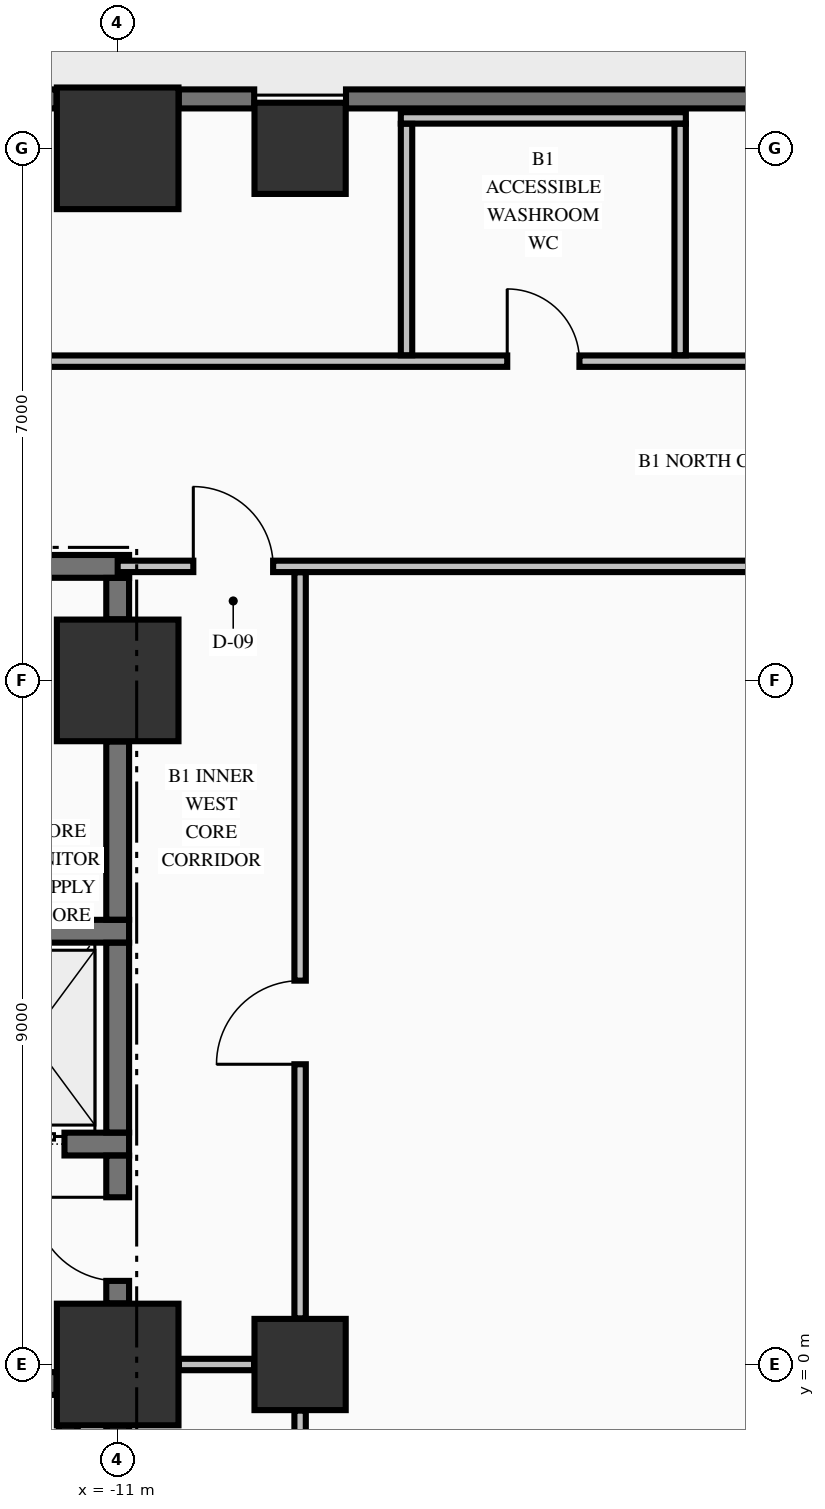
"""IFC4 building model, lengths in metres.
Left out: names, types, materials, properties, quantities, classifications, styles, units other than length and angle.
Written with IfcOpenShell. Run it as: python <this file> out.ifc"""

import sys

from ifc_helpers import new_model, si_unit, direction, frame, frame_2d, origin, origin_2d, place, context, subcontext, project, spatial, rectangle, extrude, element, fill, save


model = new_model("IFC4")
c1 = context("Model", 3, precision=1e-05, world=origin(), true_north=direction((0.0, 1.0)))
c2 = subcontext(c1, "Body", "Model", "MODEL_VIEW")
j1 = project(units=[si_unit("LENGTHUNIT", "METRE"), si_unit("PLANEANGLEUNIT", "RADIAN")], contexts=[c1])
p1 = place(None, origin())
s1 = spatial("IfcSite", under=j1, at=p1, CompositionType="ELEMENT")
p2 = place(p1, origin())
s2 = spatial("IfcBuilding", under=s1, at=p2, CompositionType="ELEMENT")
p3 = place(p2, frame((0.0, 0.0, -4.55)))
s3 = spatial("IfcBuildingStorey", under=s2, at=p3, CompositionType="ELEMENT", Elevation=-4.55)
for number, where, z_axis, x_axis in (
    (1, (-11.0, 0.0, 0.0), (0.0, 0.0, 1.0), (1.0, 0.0, 0.0)),
    (2, (-11.0, 9.0, 0.0), (0.0, 0.0, 1.0), (1.0, 0.0, 0.0)),
    (3, (-11.0, 16.0, 0.0), (0.0, 0.0, 1.0), (1.0, 0.0, 0.0)),
):
    element("IfcColumn", number, at=place(p3, frame(where, z_axis=z_axis, x_axis=x_axis)), inside=s3, PredefinedType="COLUMN", context=c2, shape_type="SweptSolid", body=[
        extrude(rectangle(XDim=1.6, YDim=1.6, at=origin_2d()), origin(), (0.0, 0.0, 1.0), 4.2),
    ])
for number, where, z_axis, x_axis in (
    (4, (-8.6, 0.0, 0.0), (0.0, 0.0, 1.0), (1.0, 0.0, 0.0)),
    (5, (-8.6, 16.0, 0.0), (0.0, 0.0, 1.0), (1.0, 0.0, 0.0)),
):
    element("IfcColumn", number, at=place(p3, frame(where, z_axis=z_axis, x_axis=x_axis)), inside=s3, PredefinedType="COLUMN", context=c2, shape_type="SweptSolid", body=[
        extrude(rectangle(XDim=1.2, YDim=1.2, at=origin_2d()), origin(), (0.0, 0.0, 1.0), 4.2),
    ])
p4 = place(p3, frame((-19.196, -0.25, 0.0), z_axis=(0.0, 0.0, 1.0), x_axis=(1.0, 0.0, 0.0)))
e6 = element("IfcWall", 6, at=p4, inside=s3, PredefinedType="SHEAR", context=c2, shape_type="SweptSolid", body=[
    extrude(rectangle(XDim=7.392, YDim=0.3, at=frame_2d((3.696, 0.0))), origin(), (0.0, 0.0, 1.0), 4.2),
])
p5 = place(p4, frame((5.496, 0.0, 0.0)))
e7 = element("IfcOpeningElement", 7, at=p5, cuts=e6, PredefinedType="OPENING", context=c2, shape_type="SweptSolid", body=[
    extrude(rectangle(XDim=1.1, YDim=2.15, at=frame_2d((0.55, 1.075))), frame((0.0, 0.16, 0.0), z_axis=(0.0, -1.0, 0.0), x_axis=(1.0, 0.0, 0.0)), (0.0, 0.0, 1.0), 0.32),
])
p6 = place(p3, frame((-14.875, 2.9, 0.0), z_axis=(0.0, 0.0, 1.0), x_axis=(1.0, 0.0, 0.0)))
e8 = element("IfcWall", 8, at=p6, inside=s3, PredefinedType="SHEAR", context=c2, shape_type="SweptSolid", body=[
    extrude(rectangle(XDim=4.025, YDim=0.3, at=frame_2d((2.012, 0.0))), origin(), (0.0, 0.0, 1.0), 4.2),
])
p7 = place(p6, frame((2.075, 0.0, 0.0)))
e9 = element("IfcOpeningElement", 9, at=p7, cuts=e8, PredefinedType="OPENING", context=c2, shape_type="SweptSolid", body=[
    extrude(rectangle(XDim=1.1, YDim=2.2, at=frame_2d((0.55, 1.1))), frame((0.0, 0.16, 0.0), z_axis=(0.0, -1.0, 0.0), x_axis=(1.0, 0.0, 0.0)), (0.0, 0.0, 1.0), 0.32),
])
p8 = place(p3, frame((-14.875, 5.7, 0.0), z_axis=(0.0, 0.0, 1.0), x_axis=(1.0, 0.0, 0.0)))
e10 = element("IfcWall", 10, at=p8, inside=s3, PredefinedType="SHEAR", context=c2, shape_type="SweptSolid", body=[
    extrude(rectangle(XDim=4.025, YDim=0.3, at=frame_2d((2.012, 0.0))), origin(), (0.0, 0.0, 1.0), 4.2),
])
p9 = place(p3, frame((-14.7, 10.5, 0.0), z_axis=(0.0, 0.0, 1.0), x_axis=(1.0, 0.0, 0.0)))
e11 = element("IfcWall", 11, at=p9, inside=s3, PredefinedType="SHEAR", context=c2, shape_type="SweptSolid", body=[
    extrude(rectangle(XDim=3.85, YDim=0.3, at=frame_2d((1.925, 0.0))), origin(), (0.0, 0.0, 1.0), 4.2),
])
p10 = place(p9, frame((0.245, 0.0, 0.0)))
e12 = element("IfcOpeningElement", 12, at=p10, cuts=e11, PredefinedType="OPENING", context=c2, shape_type="SweptSolid", body=[
    extrude(rectangle(XDim=0.95, YDim=2.15, at=frame_2d((0.475, 1.075))), frame((0.0, 0.16, 0.0), z_axis=(0.0, -1.0, 0.0), x_axis=(1.0, 0.0, 0.0)), (0.0, 0.0, 1.0), 0.32),
])
p11 = place(p3, frame((-19.196, 16.65, 0.0), z_axis=(0.0, 0.0, 1.0), x_axis=(1.0, 0.0, 0.0)))
e13 = element("IfcWall", 13, at=p11, inside=s3, PredefinedType="SOLIDWALL", context=c2, shape_type="SweptSolid", body=[
    extrude(rectangle(XDim=7.392, YDim=0.25, at=frame_2d((3.696, 0.0))), origin(), (0.0, 0.0, 1.0), 4.2),
])
p12 = place(p3, frame((-10.196, 16.65, 0.0), z_axis=(0.0, 0.0, 1.0), x_axis=(1.0, 0.0, 0.0)))
e14 = element("IfcWall", 14, at=p12, inside=s3, PredefinedType="SOLIDWALL", context=c2, shape_type="SweptSolid", body=[
    extrude(rectangle(XDim=0.992, YDim=0.25, at=frame_2d((0.496, 0.0))), origin(), (0.0, 0.0, 1.0), 4.2),
])
p13 = place(p3, frame((-7.996, 16.65, 0.0), z_axis=(0.0, 0.0, 1.0), x_axis=(1.0, 0.0, 0.0)))
e15 = element("IfcWall", 15, at=p13, inside=s3, PredefinedType="SOLIDWALL", context=c2, shape_type="SweptSolid", body=[
    extrude(rectangle(XDim=7.292, YDim=0.25, at=frame_2d((3.646, 0.0))), origin(), (0.0, 0.0, 1.0), 4.2),
])
p14 = place(p3, frame((-10.194, 0.0, 0.0), z_axis=(0.0, 0.0, 1.0), x_axis=(1.0, 0.0, 0.0)))
e16 = element("IfcWall", 16, at=p14, inside=s3, PredefinedType="PARTITIONING", context=c2, shape_type="SweptSolid", body=[
    extrude(rectangle(XDim=0.988, YDim=0.15, at=frame_2d((0.494, 0.0))), origin(), (0.0, 0.0, 1.0), 3.242),
])
p15 = place(p3, frame((-11.0, 10.5, 0.0), z_axis=(0.0, 0.0, 1.0), x_axis=(1.0, 0.0, 0.0)))
e17 = element("IfcWall", 17, at=p15, inside=s3, PredefinedType="PARTITIONING", context=c2, shape_type="SweptSolid", body=[
    extrude(rectangle(XDim=22.0, YDim=0.15, at=frame_2d((11.0, 0.0))), origin(), (0.0, 0.0, 1.0), 4.2),
])
p16 = place(p15, frame((0.995, 0.0, 0.0)))
e18 = element("IfcOpeningElement", 18, at=p16, cuts=e17, PredefinedType="OPENING", context=c2, shape_type="SweptSolid", body=[
    extrude(rectangle(XDim=1.05, YDim=2.15, at=frame_2d((0.525, 1.075))), frame((0.0, 0.085, 0.0), z_axis=(0.0, -1.0, 0.0), x_axis=(1.0, 0.0, 0.0)), (0.0, 0.0, 1.0), 0.17),
])
p17 = place(p15, frame((19.955, 0.0, 0.0)))
e19 = element("IfcOpeningElement", 19, at=p17, cuts=e17, PredefinedType="OPENING", context=c2, shape_type="SweptSolid", body=[
    extrude(rectangle(XDim=1.05, YDim=2.15, at=frame_2d((0.525, 1.075))), frame((0.0, 0.085, 0.0), z_axis=(0.0, -1.0, 0.0), x_axis=(1.0, 0.0, 0.0)), (0.0, 0.0, 1.0), 0.17),
])
p18 = place(p3, frame((-22.475, 13.2, 0.0), z_axis=(0.0, 0.0, 1.0), x_axis=(1.0, 0.0, 0.0)))
e20 = element("IfcWall", 20, at=p18, inside=s3, PredefinedType="PARTITIONING", context=c2, shape_type="SweptSolid", body=[
    extrude(rectangle(XDim=56.197, YDim=0.15, at=frame_2d((28.099, 0.0))), origin(), (0.0, 0.0, 1.0), 4.2),
])
p19 = place(p18, frame((43.125, 0.0, 0.0)))
e21 = element("IfcOpeningElement", 21, at=p19, cuts=e20, PredefinedType="OPENING", context=c2, shape_type="SweptSolid", body=[
    extrude(rectangle(XDim=1.1, YDim=2.15, at=frame_2d((0.55, 1.075))), frame((0.0, 0.085, 0.0), z_axis=(0.0, -1.0, 0.0), x_axis=(1.0, 0.0, 0.0)), (0.0, 0.0, 1.0), 0.17),
])
p20 = place(p18, frame((27.375, 0.0, 0.0)))
e22 = element("IfcOpeningElement", 22, at=p20, cuts=e20, PredefinedType="OPENING", context=c2, shape_type="SweptSolid", body=[
    extrude(rectangle(XDim=1.2, YDim=2.15, at=frame_2d((0.6, 1.075))), frame((0.0, 0.085, 0.0), z_axis=(0.0, -1.0, 0.0), x_axis=(1.0, 0.0, 0.0)), (0.0, 0.0, 1.0), 0.17),
])
p21 = place(p18, frame((46.375, 0.0, 0.0)))
e23 = element("IfcOpeningElement", 23, at=p21, cuts=e20, PredefinedType="OPENING", context=c2, shape_type="SweptSolid", body=[
    extrude(rectangle(XDim=1.2, YDim=2.15, at=frame_2d((0.6, 1.075))), frame((0.0, 0.085, 0.0), z_axis=(0.0, -1.0, 0.0), x_axis=(1.0, 0.0, 0.0)), (0.0, 0.0, 1.0), 0.17),
])
p22 = place(p18, frame((16.6, 0.0, 0.0)))
e24 = element("IfcOpeningElement", 24, at=p22, cuts=e20, PredefinedType="OPENING", context=c2, shape_type="SweptSolid", body=[
    extrude(rectangle(XDim=0.95, YDim=2.15, at=frame_2d((0.475, 1.075))), frame((0.0, 0.085, 0.0), z_axis=(0.0, -1.0, 0.0), x_axis=(1.0, 0.0, 0.0)), (0.0, 0.0, 1.0), 0.17),
])
p23 = place(p3, frame((-7.275, 16.4, 0.0), z_axis=(0.0, 0.0, 1.0), x_axis=(1.0, 0.0, 0.0)))
e25 = element("IfcWall", 25, at=p23, inside=s3, PredefinedType="PARTITIONING", context=c2, shape_type="SweptSolid", body=[
    extrude(rectangle(XDim=3.75, YDim=0.15, at=frame_2d((1.875, 0.0))), origin(), (0.0, 0.0, 1.0), 3.242),
])
p24 = place(p3, frame((-11.65, -8.196, 0.0), z_axis=(0.0, 0.0, 1.0), x_axis=(0.0, 1.0, 0.0)))
e26 = element("IfcWall", 26, at=p24, inside=s3, PredefinedType="SOLIDWALL", context=c2, shape_type="SweptSolid", body=[
    extrude(rectangle(XDim=7.392, YDim=0.25, at=frame_2d((3.696, 0.0))), origin(), (0.0, 0.0, 1.0), 4.2),
])
p25 = place(p3, frame((-11.0, -8.196, 0.0), z_axis=(0.0, 0.0, 1.0), x_axis=(0.0, 1.0, 0.0)))
e27 = element("IfcWall", 27, at=p25, inside=s3, PredefinedType="SHEAR", context=c2, shape_type="SweptSolid", body=[
    extrude(rectangle(XDim=7.392, YDim=0.3, at=frame_2d((3.696, 0.0))), origin(), (0.0, 0.0, 1.0), 4.2),
])
p26 = place(p3, frame((-11.0, 0.804, 0.0), z_axis=(0.0, 0.0, 1.0), x_axis=(0.0, 1.0, 0.0)))
e28 = element("IfcWall", 28, at=p26, inside=s3, PredefinedType="SHEAR", context=c2, shape_type="SweptSolid", body=[
    extrude(rectangle(XDim=1.944, YDim=0.3, at=frame_2d((0.972, 0.0))), origin(), (0.0, 0.0, 1.0), 4.2),
])
p27 = place(p26, frame((0.296, 0.0, 0.0)))
e29 = element("IfcOpeningElement", 29, at=p27, cuts=e28, PredefinedType="OPENING", context=c2, shape_type="SweptSolid", body=[
    extrude(rectangle(XDim=1.1, YDim=2.15, at=frame_2d((0.55, 1.075))), frame((0.0, 0.16, 0.0), z_axis=(0.0, -1.0, 0.0), x_axis=(1.0, 0.0, 0.0)), (0.0, 0.0, 1.0), 0.32),
])
p28 = place(p3, frame((-11.0, 3.052, 0.0), z_axis=(0.0, 0.0, 1.0), x_axis=(0.0, 1.0, 0.0)))
e30 = element("IfcWall", 30, at=p28, inside=s3, PredefinedType="SHEAR", context=c2, shape_type="SweptSolid", body=[
    extrude(rectangle(XDim=2.496, YDim=0.3, at=frame_2d((1.248, 0.0))), origin(), (0.0, 0.0, 1.0), 4.2),
])
p29 = place(p3, frame((-11.0, 5.852, 0.0), z_axis=(0.0, 0.0, 1.0), x_axis=(0.0, 1.0, 0.0)))
e31 = element("IfcWall", 31, at=p29, inside=s3, PredefinedType="SHEAR", context=c2, shape_type="SweptSolid", body=[
    extrude(rectangle(XDim=2.344, YDim=0.3, at=frame_2d((1.172, 0.0))), origin(), (0.0, 0.0, 1.0), 4.2),
])
p30 = place(p3, frame((-11.0, 9.804, 0.0), z_axis=(0.0, 0.0, 1.0), x_axis=(0.0, 1.0, 0.0)))
e32 = element("IfcWall", 32, at=p30, inside=s3, PredefinedType="SHEAR", context=c2, shape_type="SweptSolid", body=[
    extrude(rectangle(XDim=0.544, YDim=0.3, at=frame_2d((0.272, 0.0))), origin(), (0.0, 0.0, 1.0), 4.2),
])
p31 = place(p3, frame((-8.6, -9.872, 0.0), z_axis=(0.0, 0.0, 1.0), x_axis=(0.0, 1.0, 0.0)))
e33 = element("IfcWall", 33, at=p31, inside=s3, PredefinedType="PARTITIONING", context=c2, shape_type="SweptSolid", body=[
    extrude(rectangle(XDim=9.266, YDim=0.15, at=frame_2d((4.633, 0.0))), origin(), (0.0, 0.0, 1.0), 3.242),
])
p32 = place(p3, frame((-8.6, 0.606, 0.0), z_axis=(0.0, 0.0, 1.0), x_axis=(0.0, 1.0, 0.0)))
e34 = element("IfcWall", 34, at=p32, inside=s3, PredefinedType="PARTITIONING", context=c2, shape_type="SweptSolid", body=[
    extrude(rectangle(XDim=9.816, YDim=0.15, at=frame_2d((4.908, 0.0))), origin(), (0.0, 0.0, 1.0), 3.242),
])
p33 = place(p32, frame((3.344, 0.0, 0.0)))
e35 = element("IfcOpeningElement", 35, at=p33, cuts=e34, PredefinedType="OPENING", context=c2, shape_type="SweptSolid", body=[
    extrude(rectangle(XDim=1.1, YDim=2.15, at=frame_2d((0.55, 1.075))), frame((0.0, 0.085, 0.0), z_axis=(0.0, -1.0, 0.0), x_axis=(1.0, 0.0, 0.0)), (0.0, 0.0, 1.0), 0.17),
])
for number, where, z_axis, x_axis in (
    (36, (-7.2, 13.278, 0.0), (0.0, 0.0, 1.0), (0.0, 1.0, 0.0)),
    (37, (-3.6, 13.278, 0.0), (0.0, 0.0, 1.0), (0.0, 1.0, 0.0)),
):
    element("IfcWall", number, at=place(p3, frame(where, z_axis=z_axis, x_axis=x_axis)), inside=s3, PredefinedType="PARTITIONING", context=c2, shape_type="SweptSolid", body=[
        extrude(rectangle(XDim=3.044, YDim=0.15, at=frame_2d((1.522, 0.0))), origin(), (0.0, 0.0, 1.0), 4.2),
    ])
p34 = place(p27, origin())
e38 = element("IfcDoor", 38, at=p34, inside=s3, OperationType="SINGLE_SWING_RIGHT", PredefinedType="DOOR", context=c2, shape_type="SweptSolid", body=[
    extrude(rectangle(XDim=1.1, YDim=2.15, at=frame_2d((0.55, 1.075))), frame((0.0, 0.025, 0.0), z_axis=(0.0, -1.0, 0.0), x_axis=(1.0, 0.0, 0.0)), (0.0, 0.0, 1.0), 0.05),
])
fill(e29, e38)
p35 = place(p7, origin())
e39 = element("IfcDoor", 39, at=p35, inside=s3, OperationType="SLIDING_TO_LEFT", PredefinedType="DOOR", context=c2, shape_type="SweptSolid", body=[
    extrude(rectangle(XDim=1.1, YDim=2.2, at=frame_2d((0.55, 1.1))), frame((0.0, 0.025, 0.0), z_axis=(0.0, -1.0, 0.0), x_axis=(1.0, 0.0, 0.0)), (0.0, 0.0, 1.0), 0.05),
])
fill(e9, e39)
p36 = place(p16, origin())
e40 = element("IfcDoor", 40, at=p36, inside=s3, OperationType="SINGLE_SWING_LEFT", PredefinedType="DOOR", context=c2, shape_type="SweptSolid", body=[
    extrude(rectangle(XDim=1.05, YDim=2.15, at=frame_2d((0.525, 1.075))), frame((0.0, 0.025, 0.0), z_axis=(0.0, -1.0, 0.0), x_axis=(1.0, 0.0, 0.0)), (0.0, 0.0, 1.0), 0.05),
])
fill(e18, e40)
p37 = place(p33, origin())
e41 = element("IfcDoor", 41, at=p37, inside=s3, OperationType="SINGLE_SWING_LEFT", PredefinedType="DOOR", context=c2, shape_type="SweptSolid", body=[
    extrude(rectangle(XDim=1.1, YDim=2.15, at=frame_2d((0.55, 1.075))), frame((0.0, 0.025, 0.0), z_axis=(0.0, -1.0, 0.0), x_axis=(1.0, 0.0, 0.0)), (0.0, 0.0, 1.0), 0.05),
])
fill(e35, e41)
p38 = place(p22, origin())
e42 = element("IfcDoor", 42, at=p38, inside=s3, OperationType="SINGLE_SWING_LEFT", PredefinedType="DOOR", context=c2, shape_type="SweptSolid", body=[
    extrude(rectangle(XDim=0.95, YDim=2.15, at=frame_2d((0.475, 1.075))), frame((0.0, 0.025, 0.0), z_axis=(0.0, -1.0, 0.0), x_axis=(1.0, 0.0, 0.0)), (0.0, 0.0, 1.0), 0.05),
])
fill(e24, e42)
save(model, sys.argv[1])
